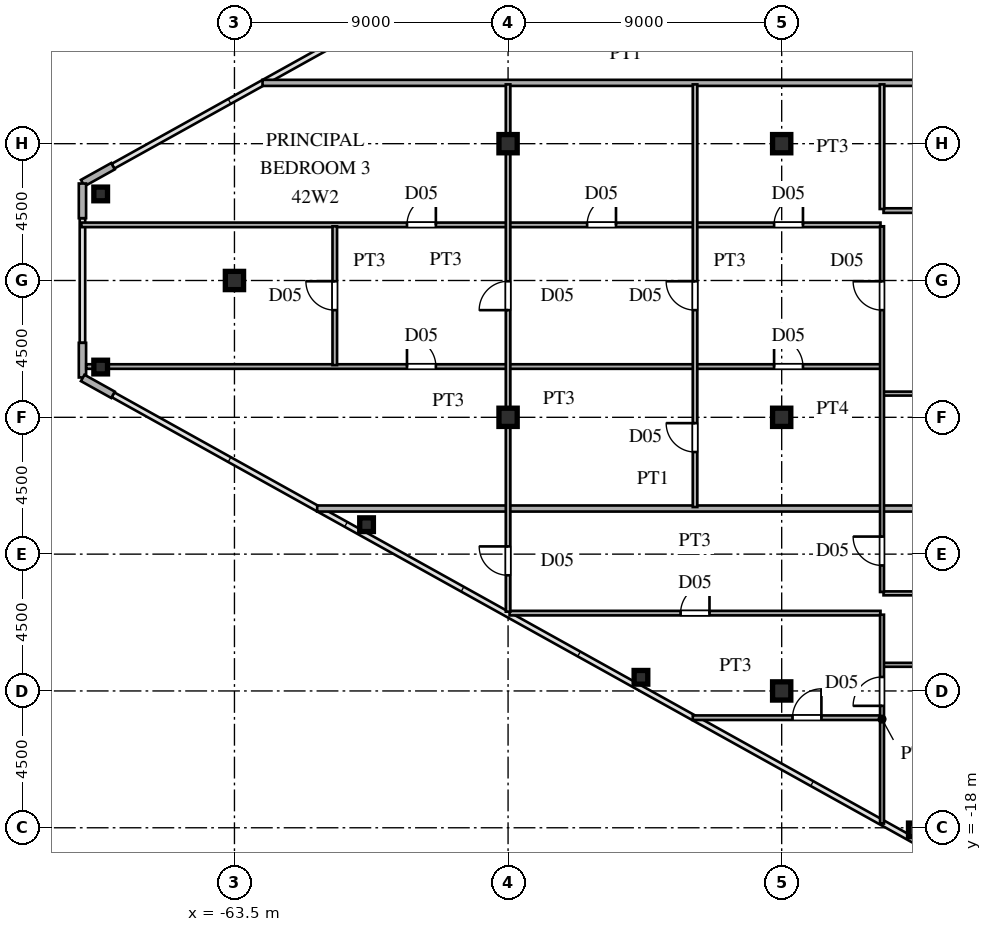
"""IFC4 building model, lengths in metres.
Left out: names, types, materials, properties, quantities, classifications, styles, units other than length and angle.
Written with IfcOpenShell. Run it as: python <this file> out.ifc"""

import sys

from ifc_helpers import new_model, si_unit, direction, frame, frame_2d, origin, origin_2d, place, context, subcontext, project, spatial, rectangle, hollow_rectangle, i_section, extrude, source, transform, mapped, element, fill, save


model = new_model("IFC4")
c1 = context("Model", 3, precision=1e-05, world=origin(), true_north=direction((0.0, 1.0)))
c2 = subcontext(c1, "Body", "Model", "MODEL_VIEW")
j1 = project(units=[si_unit("LENGTHUNIT", "METRE"), si_unit("PLANEANGLEUNIT", "RADIAN")], contexts=[c1])
p1 = place(None, origin())
s1 = spatial("IfcSite", under=j1, at=p1, CompositionType="ELEMENT")
p2 = place(p1, origin())
s2 = spatial("IfcBuilding", under=s1, at=p2, CompositionType="ELEMENT")
p3 = place(p2, frame((0.0, 0.0, 158.4)))
s3 = spatial("IfcBuildingStorey", under=s2, at=p3, CompositionType="ELEMENT", Elevation=158.4)
m1 = source(origin(), c2, "Body", "SweptSolid", [
    extrude(i_section(OverallWidth=0.6, OverallDepth=0.6, WebThickness=0.025, FlangeThickness=0.04, at=origin_2d()), origin(), (0.0, 0.0, 1.0), 3.6),
])
for number, where, z_axis, x_axis in (
    (1, (-45.5, -13.5, 0.0), (0.0, 0.0, 1.0), (1.0, 0.0, 0.0)),
    (2, (-45.5, -4.5, 0.0), (0.0, 0.0, 1.0), (1.0, 0.0, 0.0)),
    (3, (-45.5, 4.5, 0.0), (0.0, 0.0, 1.0), (1.0, 0.0, 0.0)),
    (4, (-54.5, -4.5, 0.0), (0.0, 0.0, 1.0), (1.0, 0.0, 0.0)),
    (5, (-54.5, 4.5, 0.0), (0.0, 0.0, 1.0), (1.0, 0.0, 0.0)),
    (6, (-63.5, 0.0, 0.0), (0.0, 0.0, 1.0), (1.0, 0.0, 0.0)),
):
    element("IfcColumn", number, at=place(p3, frame(where, z_axis=z_axis, x_axis=x_axis)), inside=s3, PredefinedType="COLUMN", context=c2, shape_type="MappedRepresentation", body=[
        mapped(m1, transform((0.0, 0.0, 0.0), scale=1.0)),
    ])
m2 = source(origin(), c2, "Body", "SweptSolid", [
    extrude(hollow_rectangle(XDim=0.45, YDim=0.45, WallThickness=0.018, at=origin_2d()), origin(), (0.0, 0.0, 1.0), 3.6),
])
for number, where, z_axis, x_axis in (
    (7, (-67.9, 2.847, 0.0), (0.0, 0.0, 1.0), (1.0, 0.0, 0.0)),
    (8, (-67.9, -2.847, 0.0), (0.0, 0.0, 1.0), (1.0, 0.0, 0.0)),
    (9, (-41.104, -18.071, 0.0), (0.0, 0.0, 1.0), (1.0, 0.0, 0.0)),
    (10, (-50.129, -13.051, 0.0), (0.0, 0.0, 1.0), (1.0, 0.0, 0.0)),
    (11, (-59.155, -8.031, 0.0), (0.0, 0.0, 1.0), (1.0, 0.0, 0.0)),
):
    element("IfcColumn", number, at=place(p3, frame(where, z_axis=z_axis, x_axis=x_axis)), inside=s3, PredefinedType="COLUMN", context=c2, shape_type="MappedRepresentation", body=[
        mapped(m2, transform((0.0, 0.0, 0.0), scale=1.0)),
    ])
for number, where, z_axis, x_axis in (
    (12, (-67.495, 3.759, 0.0), (0.0, 0.0, 1.0), (-0.874, -0.486, 0.0)),
    (13, (-68.5, 3.19, 0.0), (0.0, 0.0, 1.0), (0.0, -1.0, 0.0)),
    (14, (-68.5, -2.05, 0.0), (0.0, 0.0, 1.0), (0.0, -1.0, 0.0)),
    (15, (-68.491, -3.205, 0.0), (0.0, 0.0, 1.0), (0.874, -0.486, 0.0)),
):
    element("IfcWall", number, at=place(p3, frame(where, z_axis=z_axis, x_axis=x_axis)), inside=s3, PredefinedType="SOLIDWALL", context=c2, shape_type="SweptSolid", body=[
        extrude(rectangle(XDim=1.14, YDim=0.24, at=frame_2d((0.57, 0.0))), origin(), (0.0, 0.0, 1.0), 3.34),
    ])
p4 = place(p3, frame((-48.425, -14.38, 0.0), z_axis=(0.0, 0.0, 1.0), x_axis=(1.0, 0.0, 0.0)))
e16 = element("IfcWall", 16, at=p4, inside=s3, PredefinedType="PARTITIONING", context=c2, shape_type="SweptSolid", body=[
    extrude(rectangle(XDim=6.175, YDim=0.15, at=frame_2d((3.087, 0.0))), origin(), (0.0, 0.0, 1.0), 3.34),
])
p5 = place(p4, frame((3.281, 0.0, 0.0)))
e17 = element("IfcOpeningElement", 17, at=p5, cuts=e16, PredefinedType="OPENING", context=c2, shape_type="SweptSolid", body=[
    extrude(rectangle(XDim=0.95, YDim=2.15, at=frame_2d((0.475, 1.075))), frame((0.0, 0.085, 0.0), z_axis=(0.0, -1.0, 0.0), x_axis=(1.0, 0.0, 0.0)), (0.0, 0.0, 1.0), 0.17),
])
p6 = place(p3, frame((-42.15, -12.64, 0.0), z_axis=(0.0, 0.0, 1.0), x_axis=(1.0, 0.0, 0.0)))
e18 = element("IfcWall", 18, at=p6, inside=s3, PredefinedType="PARTITIONING", context=c2, shape_type="SweptSolid", body=[
    extrude(rectangle(XDim=3.5, YDim=0.13, at=frame_2d((1.75, 0.0))), origin(), (0.0, 0.0, 1.0), 3.34),
])
p7 = place(p3, frame((-54.45, -10.94, 0.0), z_axis=(0.0, 0.0, 1.0), x_axis=(1.0, 0.0, 0.0)))
e19 = element("IfcWall", 19, at=p7, inside=s3, PredefinedType="PARTITIONING", context=c2, shape_type="SweptSolid", body=[
    extrude(rectangle(XDim=12.2, YDim=0.15, at=frame_2d((6.1, 0.0))), origin(), (0.0, 0.0, 1.0), 3.34),
])
p8 = place(p7, frame((5.625, 0.0, 0.0)))
e20 = element("IfcOpeningElement", 20, at=p8, cuts=e19, PredefinedType="OPENING", context=c2, shape_type="SweptSolid", body=[
    extrude(rectangle(XDim=0.95, YDim=2.15, at=frame_2d((0.475, 1.075))), frame((0.0, 0.085, 0.0), z_axis=(0.0, -1.0, 0.0), x_axis=(1.0, 0.0, 0.0)), (0.0, 0.0, 1.0), 0.17),
])
p9 = place(p3, frame((-42.15, -10.29, 0.0), z_axis=(0.0, 0.0, 1.0), x_axis=(1.0, 0.0, 0.0)))
e21 = element("IfcWall", 21, at=p9, inside=s3, PredefinedType="PARTITIONING", context=c2, shape_type="SweptSolid", body=[
    extrude(rectangle(XDim=3.5, YDim=0.13, at=frame_2d((1.75, 0.0))), origin(), (0.0, 0.0, 1.0), 3.34),
])
p10 = place(p9, frame((1.31, 0.0, 0.0)))
e22 = element("IfcOpeningElement", 22, at=p10, cuts=e21, PredefinedType="OPENING", context=c2, shape_type="SweptSolid", body=[
    extrude(rectangle(XDim=0.88, YDim=2.1, at=frame_2d((0.44, 1.05))), frame((0.0, 0.075, 0.0), z_axis=(0.0, -1.0, 0.0), x_axis=(1.0, 0.0, 0.0)), (0.0, 0.0, 1.0), 0.15),
])
p11 = place(p3, frame((-60.779, -7.5, 0.0), z_axis=(0.0, 0.0, 1.0), x_axis=(1.0, 0.0, 0.0)))
e23 = element("IfcWall", 23, at=p11, inside=s3, PredefinedType="PARTITIONING", context=c2, shape_type="SweptSolid", body=[
    extrude(rectangle(XDim=22.099, YDim=0.2, at=frame_2d((11.05, 0.0))), origin(), (0.0, 0.0, 1.0), 3.34),
])
p12 = place(p3, frame((-42.15, -3.72, 0.0), z_axis=(0.0, 0.0, 1.0), x_axis=(1.0, 0.0, 0.0)))
e24 = element("IfcWall", 24, at=p12, inside=s3, PredefinedType="PARTITIONING", context=c2, shape_type="SweptSolid", body=[
    extrude(rectangle(XDim=3.5, YDim=0.13, at=frame_2d((1.75, 0.0))), origin(), (0.0, 0.0, 1.0), 3.34),
])
p13 = place(p12, frame((1.31, 0.0, 0.0)))
e25 = element("IfcOpeningElement", 25, at=p13, cuts=e24, PredefinedType="OPENING", context=c2, shape_type="SweptSolid", body=[
    extrude(rectangle(XDim=0.88, YDim=2.1, at=frame_2d((0.44, 1.05))), frame((0.0, 0.075, 0.0), z_axis=(0.0, -1.0, 0.0), x_axis=(1.0, 0.0, 0.0)), (0.0, 0.0, 1.0), 0.15),
])
p14 = place(p3, frame((-68.375, -2.83, 0.0), z_axis=(0.0, 0.0, 1.0), x_axis=(1.0, 0.0, 0.0)))
e26 = element("IfcWall", 26, at=p14, inside=s3, PredefinedType="PARTITIONING", context=c2, shape_type="SweptSolid", body=[
    extrude(rectangle(XDim=26.125, YDim=0.15, at=frame_2d((13.062, 0.0))), origin(), (0.0, 0.0, 1.0), 3.34),
])
p15 = place(p14, frame((22.625, 0.0, 0.0)))
e27 = element("IfcOpeningElement", 27, at=p15, cuts=e26, PredefinedType="OPENING", context=c2, shape_type="SweptSolid", body=[
    extrude(rectangle(XDim=0.95, YDim=2.15, at=frame_2d((0.475, 1.075))), frame((0.0, 0.085, 0.0), z_axis=(0.0, -1.0, 0.0), x_axis=(1.0, 0.0, 0.0)), (0.0, 0.0, 1.0), 0.17),
])
p16 = place(p14, frame((10.55, 0.0, 0.0)))
e28 = element("IfcOpeningElement", 28, at=p16, cuts=e26, PredefinedType="OPENING", context=c2, shape_type="SweptSolid", body=[
    extrude(rectangle(XDim=0.95, YDim=2.15, at=frame_2d((0.475, 1.075))), frame((0.0, 0.085, 0.0), z_axis=(0.0, -1.0, 0.0), x_axis=(1.0, 0.0, 0.0)), (0.0, 0.0, 1.0), 0.17),
])
p17 = place(p3, frame((-68.535, 1.83, 0.0), z_axis=(0.0, 0.0, 1.0), x_axis=(1.0, 0.0, 0.0)))
e29 = element("IfcWall", 29, at=p17, inside=s3, PredefinedType="PARTITIONING", context=c2, shape_type="SweptSolid", body=[
    extrude(rectangle(XDim=26.285, YDim=0.15, at=frame_2d((13.143, 0.0))), origin(), (0.0, 0.0, 1.0), 3.34),
])
p18 = place(p17, frame((22.785, 0.0, 0.0)))
e30 = element("IfcOpeningElement", 30, at=p18, cuts=e29, PredefinedType="OPENING", context=c2, shape_type="SweptSolid", body=[
    extrude(rectangle(XDim=0.95, YDim=2.15, at=frame_2d((0.475, 1.075))), frame((0.0, 0.085, 0.0), z_axis=(0.0, -1.0, 0.0), x_axis=(1.0, 0.0, 0.0)), (0.0, 0.0, 1.0), 0.17),
])
p19 = place(p17, frame((10.71, 0.0, 0.0)))
e31 = element("IfcOpeningElement", 31, at=p19, cuts=e29, PredefinedType="OPENING", context=c2, shape_type="SweptSolid", body=[
    extrude(rectangle(XDim=0.95, YDim=2.15, at=frame_2d((0.475, 1.075))), frame((0.0, 0.085, 0.0), z_axis=(0.0, -1.0, 0.0), x_axis=(1.0, 0.0, 0.0)), (0.0, 0.0, 1.0), 0.17),
])
p20 = place(p17, frame((16.635, 0.0, 0.0)))
e32 = element("IfcOpeningElement", 32, at=p20, cuts=e29, PredefinedType="OPENING", context=c2, shape_type="SweptSolid", body=[
    extrude(rectangle(XDim=0.95, YDim=2.15, at=frame_2d((0.475, 1.075))), frame((0.0, 0.085, 0.0), z_axis=(0.0, -1.0, 0.0), x_axis=(1.0, 0.0, 0.0)), (0.0, 0.0, 1.0), 0.17),
])
p21 = place(p3, frame((-42.15, 2.3, 0.0), z_axis=(0.0, 0.0, 1.0), x_axis=(1.0, 0.0, 0.0)))
e33 = element("IfcWall", 33, at=p21, inside=s3, PredefinedType="PARTITIONING", context=c2, shape_type="SweptSolid", body=[
    extrude(rectangle(XDim=3.5, YDim=0.15, at=frame_2d((1.75, 0.0))), origin(), (0.0, 0.0, 1.0), 3.34),
])
p22 = place(p21, frame((1.275, 0.0, 0.0)))
e34 = element("IfcOpeningElement", 34, at=p22, cuts=e33, PredefinedType="OPENING", context=c2, shape_type="SweptSolid", body=[
    extrude(rectangle(XDim=0.95, YDim=2.15, at=frame_2d((0.475, 1.075))), frame((0.0, 0.085, 0.0), z_axis=(0.0, -1.0, 0.0), x_axis=(1.0, 0.0, 0.0)), (0.0, 0.0, 1.0), 0.17),
])
p23 = place(p3, frame((-62.577, 6.5, 0.0), z_axis=(0.0, 0.0, 1.0), x_axis=(1.0, 0.0, 0.0)))
e35 = element("IfcWall", 35, at=p23, inside=s3, PredefinedType="PARTITIONING", context=c2, shape_type="SweptSolid", body=[
    extrude(rectangle(XDim=23.897, YDim=0.2, at=frame_2d((11.948, 0.0))), origin(), (0.0, 0.0, 1.0), 3.34),
])
p24 = place(p3, frame((-60.2, -2.783, 0.0), z_axis=(0.0, 0.0, 1.0), x_axis=(0.0, 1.0, 0.0)))
e36 = element("IfcWall", 36, at=p24, inside=s3, PredefinedType="PARTITIONING", context=c2, shape_type="SweptSolid", body=[
    extrude(rectangle(XDim=4.566, YDim=0.15, at=frame_2d((2.283, 0.0))), origin(), (0.0, 0.0, 1.0), 3.34),
])
p25 = place(p24, frame((1.808, 0.0, 0.0)))
e37 = element("IfcOpeningElement", 37, at=p25, cuts=e36, PredefinedType="OPENING", context=c2, shape_type="SweptSolid", body=[
    extrude(rectangle(XDim=0.95, YDim=2.15, at=frame_2d((0.475, 1.075))), frame((0.0, 0.085, 0.0), z_axis=(0.0, -1.0, 0.0), x_axis=(1.0, 0.0, 0.0)), (0.0, 0.0, 1.0), 0.17),
])
p26 = place(p3, frame((-54.5, -10.892, 0.0), z_axis=(0.0, 0.0, 1.0), x_axis=(0.0, 1.0, 0.0)))
e38 = element("IfcWall", 38, at=p26, inside=s3, PredefinedType="PARTITIONING", context=c2, shape_type="SweptSolid", body=[
    extrude(rectangle(XDim=6.372, YDim=0.15, at=frame_2d((3.186, 0.0))), origin(), (0.0, 0.0, 1.0), 3.34),
])
p27 = place(p26, frame((1.196, 0.0, 0.0)))
e39 = element("IfcOpeningElement", 39, at=p27, cuts=e38, PredefinedType="OPENING", context=c2, shape_type="SweptSolid", body=[
    extrude(rectangle(XDim=0.95, YDim=2.15, at=frame_2d((0.475, 1.075))), frame((0.0, 0.085, 0.0), z_axis=(0.0, -1.0, 0.0), x_axis=(1.0, 0.0, 0.0)), (0.0, 0.0, 1.0), 0.17),
])
p28 = place(p3, frame((-54.5, -4.52, 0.0), z_axis=(0.0, 0.0, 1.0), x_axis=(0.0, 1.0, 0.0)))
e40 = element("IfcWall", 40, at=p28, inside=s3, PredefinedType="PARTITIONING", context=c2, shape_type="SweptSolid", body=[
    extrude(rectangle(XDim=9.04, YDim=0.15, at=frame_2d((4.52, 0.0))), origin(), (0.0, 0.0, 1.0), 2.44),
])
p29 = place(p28, frame((3.545, 0.0, 0.0)))
e41 = element("IfcOpeningElement", 41, at=p29, cuts=e40, PredefinedType="OPENING", context=c2, shape_type="SweptSolid", body=[
    extrude(rectangle(XDim=0.95, YDim=2.15, at=frame_2d((0.475, 1.075))), frame((0.0, 0.085, 0.0), z_axis=(0.0, -1.0, 0.0), x_axis=(1.0, 0.0, 0.0)), (0.0, 0.0, 1.0), 0.17),
])
p30 = place(p3, frame((-54.5, 4.52, 0.0), z_axis=(0.0, 0.0, 1.0), x_axis=(0.0, 1.0, 0.0)))
e42 = element("IfcWall", 42, at=p30, inside=s3, PredefinedType="PARTITIONING", context=c2, shape_type="SweptSolid", body=[
    extrude(rectangle(XDim=1.93, YDim=0.15, at=frame_2d((0.965, 0.0))), origin(), (0.0, 0.0, 1.0), 3.34),
])
p31 = place(p3, frame((-48.35, -7.45, 0.0), z_axis=(0.0, 0.0, 1.0), x_axis=(0.0, 1.0, 0.0)))
e43 = element("IfcWall", 43, at=p31, inside=s3, PredefinedType="PARTITIONING", context=c2, shape_type="SweptSolid", body=[
    extrude(rectangle(XDim=13.9, YDim=0.15, at=frame_2d((6.95, 0.0))), origin(), (0.0, 0.0, 1.0), 3.34),
])
p32 = place(p31, frame((6.475, 0.0, 0.0)))
e44 = element("IfcOpeningElement", 44, at=p32, cuts=e43, PredefinedType="OPENING", context=c2, shape_type="SweptSolid", body=[
    extrude(rectangle(XDim=0.95, YDim=2.15, at=frame_2d((0.475, 1.075))), frame((0.0, 0.085, 0.0), z_axis=(0.0, -1.0, 0.0), x_axis=(1.0, 0.0, 0.0)), (0.0, 0.0, 1.0), 0.17),
])
p33 = place(p31, frame((1.808, 0.0, 0.0)))
e45 = element("IfcOpeningElement", 45, at=p33, cuts=e43, PredefinedType="OPENING", context=c2, shape_type="SweptSolid", body=[
    extrude(rectangle(XDim=0.95, YDim=2.15, at=frame_2d((0.475, 1.075))), frame((0.0, 0.085, 0.0), z_axis=(0.0, -1.0, 0.0), x_axis=(1.0, 0.0, 0.0)), (0.0, 0.0, 1.0), 0.17),
])
p34 = place(p3, frame((-42.2, -17.862, 0.0), z_axis=(0.0, 0.0, 1.0), x_axis=(0.0, 1.0, 0.0)))
e46 = element("IfcWall", 46, at=p34, inside=s3, PredefinedType="PARTITIONING", context=c2, shape_type="SweptSolid", body=[
    extrude(rectangle(XDim=6.87, YDim=0.13, at=frame_2d((3.435, 0.0))), origin(), (0.0, 0.0, 1.0), 3.34),
])
p35 = place(p34, frame((3.872, 0.0, 0.0)))
e47 = element("IfcOpeningElement", 47, at=p35, cuts=e46, PredefinedType="OPENING", context=c2, shape_type="SweptSolid", body=[
    extrude(rectangle(XDim=0.95, YDim=2.15, at=frame_2d((0.475, 1.075))), frame((0.0, 0.075, 0.0), z_axis=(0.0, -1.0, 0.0), x_axis=(1.0, 0.0, 0.0)), (0.0, 0.0, 1.0), 0.15),
])
p36 = place(p3, frame((-42.2, -10.245, 0.0), z_axis=(0.0, 0.0, 1.0), x_axis=(0.0, 1.0, 0.0)))
e48 = element("IfcWall", 48, at=p36, inside=s3, PredefinedType="PARTITIONING", context=c2, shape_type="SweptSolid", body=[
    extrude(rectangle(XDim=12.028, YDim=0.13, at=frame_2d((6.014, 0.0))), origin(), (0.0, 0.0, 1.0), 3.34),
])
p37 = place(p36, frame((0.873, 0.0, 0.0)))
e49 = element("IfcOpeningElement", 49, at=p37, cuts=e48, PredefinedType="OPENING", context=c2, shape_type="SweptSolid", body=[
    extrude(rectangle(XDim=0.95, YDim=2.15, at=frame_2d((0.475, 1.075))), frame((0.0, 0.075, 0.0), z_axis=(0.0, -1.0, 0.0), x_axis=(1.0, 0.0, 0.0)), (0.0, 0.0, 1.0), 0.15),
])
p38 = place(p36, frame((9.27, 0.0, 0.0)))
e50 = element("IfcOpeningElement", 50, at=p38, cuts=e48, PredefinedType="OPENING", context=c2, shape_type="SweptSolid", body=[
    extrude(rectangle(XDim=0.95, YDim=2.15, at=frame_2d((0.475, 1.075))), frame((0.0, 0.075, 0.0), z_axis=(0.0, -1.0, 0.0), x_axis=(1.0, 0.0, 0.0)), (0.0, 0.0, 1.0), 0.15),
])
p39 = place(p3, frame((-42.2, 2.352, 0.0), z_axis=(0.0, 0.0, 1.0), x_axis=(0.0, 1.0, 0.0)))
e51 = element("IfcWall", 51, at=p39, inside=s3, PredefinedType="PARTITIONING", context=c2, shape_type="SweptSolid", body=[
    extrude(rectangle(XDim=4.098, YDim=0.15, at=frame_2d((2.049, 0.0))), origin(), (0.0, 0.0, 1.0), 3.34),
])
m3 = source(origin(), c2, "Body", "SweptSolid", [
    extrude(rectangle(XDim=0.95, YDim=2.15, at=frame_2d((0.475, 1.075))), frame((0.0, 0.025, 0.0), z_axis=(0.0, -1.0, 0.0), x_axis=(1.0, 0.0, 0.0)), (0.0, 0.0, 1.0), 0.05),
])
p40 = place(p5, origin())
e52 = element("IfcDoor", 52, at=p40, inside=s3, OperationType="SINGLE_SWING_RIGHT", PredefinedType="DOOR", context=c2, shape_type="MappedRepresentation", body=[
    mapped(m3, transform((0.0, 0.0, 0.0), scale=1.0)),
])
fill(e17, e52)
p41 = place(p8, origin())
e53 = element("IfcDoor", 53, at=p41, inside=s3, OperationType="SINGLE_SWING_RIGHT", PredefinedType="DOOR", context=c2, shape_type="MappedRepresentation", body=[
    mapped(m3, transform((0.0, 0.0, 0.0), scale=1.0)),
])
fill(e20, e53)
p42 = place(p15, origin())
e54 = element("IfcDoor", 54, at=p42, inside=s3, OperationType="SINGLE_SWING_LEFT", PredefinedType="DOOR", context=c2, shape_type="MappedRepresentation", body=[
    mapped(m3, transform((0.0, 0.0, 0.0), scale=1.0)),
])
fill(e27, e54)
p43 = place(p16, origin())
e55 = element("IfcDoor", 55, at=p43, inside=s3, OperationType="SINGLE_SWING_LEFT", PredefinedType="DOOR", context=c2, shape_type="MappedRepresentation", body=[
    mapped(m3, transform((0.0, 0.0, 0.0), scale=1.0)),
])
fill(e28, e55)
p44 = place(p18, origin())
e56 = element("IfcDoor", 56, at=p44, inside=s3, OperationType="SINGLE_SWING_RIGHT", PredefinedType="DOOR", context=c2, shape_type="MappedRepresentation", body=[
    mapped(m3, transform((0.0, 0.0, 0.0), scale=1.0)),
])
fill(e30, e56)
p45 = place(p19, origin())
e57 = element("IfcDoor", 57, at=p45, inside=s3, OperationType="SINGLE_SWING_RIGHT", PredefinedType="DOOR", context=c2, shape_type="MappedRepresentation", body=[
    mapped(m3, transform((0.0, 0.0, 0.0), scale=1.0)),
])
fill(e31, e57)
p46 = place(p20, origin())
e58 = element("IfcDoor", 58, at=p46, inside=s3, OperationType="SINGLE_SWING_RIGHT", PredefinedType="DOOR", context=c2, shape_type="MappedRepresentation", body=[
    mapped(m3, transform((0.0, 0.0, 0.0), scale=1.0)),
])
fill(e32, e58)
p47 = place(p25, origin())
e59 = element("IfcDoor", 59, at=p47, inside=s3, OperationType="SINGLE_SWING_RIGHT", PredefinedType="DOOR", context=c2, shape_type="MappedRepresentation", body=[
    mapped(m3, transform((0.0, 0.0, 0.0), scale=1.0)),
])
fill(e37, e59)
p48 = place(p27, origin())
e60 = element("IfcDoor", 60, at=p48, inside=s3, OperationType="SINGLE_SWING_RIGHT", PredefinedType="DOOR", context=c2, shape_type="MappedRepresentation", body=[
    mapped(m3, transform((0.0, 0.0, 0.0), scale=1.0)),
])
fill(e39, e60)
p49 = place(p29, origin())
e61 = element("IfcDoor", 61, at=p49, inside=s3, OperationType="SINGLE_SWING_LEFT", PredefinedType="DOOR", context=c2, shape_type="MappedRepresentation", body=[
    mapped(m3, transform((0.0, 0.0, 0.0), scale=1.0)),
])
fill(e41, e61)
p50 = place(p32, origin())
e62 = element("IfcDoor", 62, at=p50, inside=s3, OperationType="SINGLE_SWING_RIGHT", PredefinedType="DOOR", context=c2, shape_type="MappedRepresentation", body=[
    mapped(m3, transform((0.0, 0.0, 0.0), scale=1.0)),
])
fill(e44, e62)
p51 = place(p33, origin())
e63 = element("IfcDoor", 63, at=p51, inside=s3, OperationType="SINGLE_SWING_RIGHT", PredefinedType="DOOR", context=c2, shape_type="MappedRepresentation", body=[
    mapped(m3, transform((0.0, 0.0, 0.0), scale=1.0)),
])
fill(e45, e63)
p52 = place(p35, origin())
e64 = element("IfcDoor", 64, at=p52, inside=s3, OperationType="SINGLE_SWING_LEFT", PredefinedType="DOOR", context=c2, shape_type="MappedRepresentation", body=[
    mapped(m3, transform((0.0, 0.0, 0.0), scale=1.0)),
])
fill(e47, e64)
p53 = place(p37, origin())
e65 = element("IfcDoor", 65, at=p53, inside=s3, OperationType="SINGLE_SWING_RIGHT", PredefinedType="DOOR", context=c2, shape_type="MappedRepresentation", body=[
    mapped(m3, transform((0.0, 0.0, 0.0), scale=1.0)),
])
fill(e49, e65)
p54 = place(p38, origin())
e66 = element("IfcDoor", 66, at=p54, inside=s3, OperationType="SINGLE_SWING_RIGHT", PredefinedType="DOOR", context=c2, shape_type="MappedRepresentation", body=[
    mapped(m3, transform((0.0, 0.0, 0.0), scale=1.0)),
])
fill(e50, e66)
save(model, sys.argv[1])
